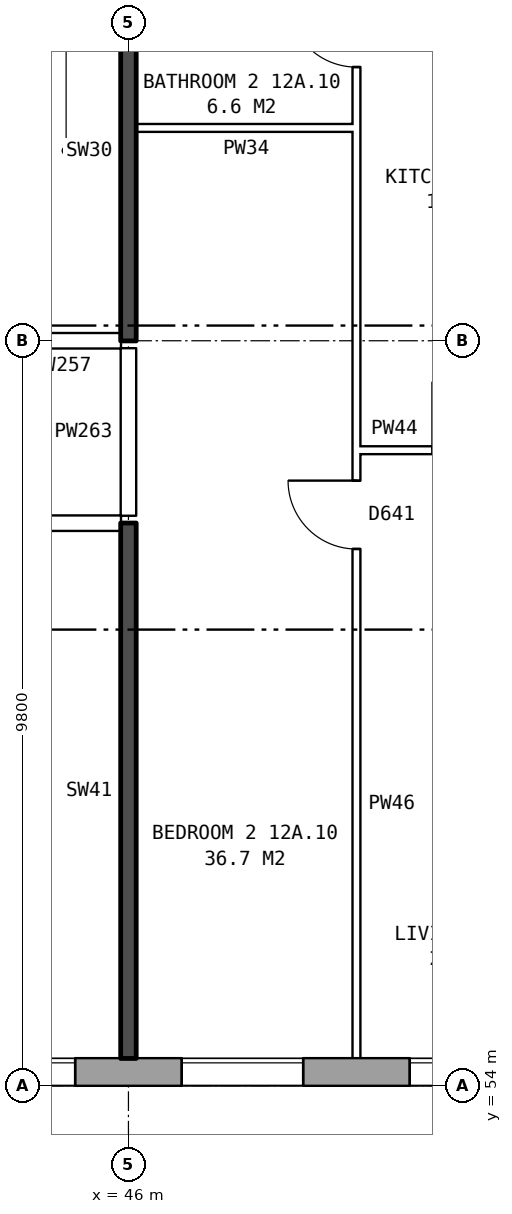
"""IFC4 building model, lengths in metres.
Left out: names, types, materials, properties, quantities, classifications, styles, units other than length and angle.
Written with IfcOpenShell. Run it as: python <this file> out.ifc"""

import sys

from ifc_helpers import new_model, si_unit, direction, frame, frame_2d, origin, place, context, subcontext, project, spatial, rectangle, extrude, element, fill, save


model = new_model("IFC4")
c1 = context("Model", 3, precision=1e-05, world=origin(), true_north=direction((0.0, 1.0)))
c2 = subcontext(c1, "Body", "Model", "MODEL_VIEW")
j1 = project(units=[si_unit("LENGTHUNIT", "METRE"), si_unit("PLANEANGLEUNIT", "RADIAN")], contexts=[c1])
p1 = place(None, origin())
s1 = spatial("IfcSite", under=j1, at=p1, CompositionType="ELEMENT")
p2 = place(p1, origin())
s2 = spatial("IfcBuilding", under=s1, at=p2, CompositionType="ELEMENT")
p3 = place(p2, frame((0.0, 0.0, 47.4)))
s3 = spatial("IfcBuildingStorey", under=s2, at=p3, CompositionType="ELEMENT", Elevation=47.4)
p4 = place(p3, frame((24.575, 54.18, 0.0), z_axis=(0.0, 0.0, 1.0), x_axis=(1.0, 0.0, 0.0)))
e1 = element("IfcWall", 1, at=p4, inside=s3, PredefinedType="STANDARD", context=c2, shape_type="SweptSolid", body=[
    extrude(rectangle(XDim=48.351, YDim=0.36, at=frame_2d((24.175, 0.0))), origin(), (0.0, 0.0, 1.0), 2.85),
])
p5 = place(p4, frame((1.125, 0.0, 0.8)))
e2 = element("IfcOpeningElement", 2, at=p5, cuts=e1, PredefinedType="OPENING", context=c2, shape_type="SweptSolid", body=[
    extrude(rectangle(XDim=1.6, YDim=1.8, at=frame_2d((0.8, 0.9))), frame((0.0, 0.19, 0.0), z_axis=(0.0, -1.0, 0.0), x_axis=(1.0, 0.0, 0.0)), (0.0, 0.0, 1.0), 0.38),
])
p6 = place(p4, frame((5.625, 0.0, 0.8)))
e3 = element("IfcOpeningElement", 3, at=p6, cuts=e1, PredefinedType="OPENING", context=c2, shape_type="SweptSolid", body=[
    extrude(rectangle(XDim=1.2, YDim=1.2, at=frame_2d((0.6, 0.6))), frame((0.0, 0.19, 0.0), z_axis=(0.0, -1.0, 0.0), x_axis=(1.0, 0.0, 0.0)), (0.0, 0.0, 1.0), 0.38),
])
p7 = place(p4, frame((7.125, 0.0, 0.8)))
e4 = element("IfcOpeningElement", 4, at=p7, cuts=e1, PredefinedType="OPENING", context=c2, shape_type="SweptSolid", body=[
    extrude(rectangle(XDim=1.6, YDim=1.8, at=frame_2d((0.8, 0.9))), frame((0.0, 0.19, 0.0), z_axis=(0.0, -1.0, 0.0), x_axis=(1.0, 0.0, 0.0)), (0.0, 0.0, 1.0), 0.38),
])
p8 = place(p4, frame((10.125, 0.0, 0.8)))
e5 = element("IfcOpeningElement", 5, at=p8, cuts=e1, PredefinedType="OPENING", context=c2, shape_type="SweptSolid", body=[
    extrude(rectangle(XDim=1.6, YDim=1.8, at=frame_2d((0.8, 0.9))), frame((0.0, 0.19, 0.0), z_axis=(0.0, -1.0, 0.0), x_axis=(1.0, 0.0, 0.0)), (0.0, 0.0, 1.0), 0.38),
])
p9 = place(p4, frame((13.125, 0.0, 0.8)))
e6 = element("IfcOpeningElement", 6, at=p9, cuts=e1, PredefinedType="OPENING", context=c2, shape_type="SweptSolid", body=[
    extrude(rectangle(XDim=1.6, YDim=1.8, at=frame_2d((0.8, 0.9))), frame((0.0, 0.19, 0.0), z_axis=(0.0, -1.0, 0.0), x_axis=(1.0, 0.0, 0.0)), (0.0, 0.0, 1.0), 0.38),
])
p10 = place(p4, frame((16.125, 0.0, 0.8)))
e7 = element("IfcOpeningElement", 7, at=p10, cuts=e1, PredefinedType="OPENING", context=c2, shape_type="SweptSolid", body=[
    extrude(rectangle(XDim=1.6, YDim=1.8, at=frame_2d((0.8, 0.9))), frame((0.0, 0.19, 0.0), z_axis=(0.0, -1.0, 0.0), x_axis=(1.0, 0.0, 0.0)), (0.0, 0.0, 1.0), 0.38),
])
p11 = place(p4, frame((19.125, 0.0, 0.8)))
e8 = element("IfcOpeningElement", 8, at=p11, cuts=e1, PredefinedType="OPENING", context=c2, shape_type="SweptSolid", body=[
    extrude(rectangle(XDim=1.6, YDim=1.8, at=frame_2d((0.8, 0.9))), frame((0.0, 0.19, 0.0), z_axis=(0.0, -1.0, 0.0), x_axis=(1.0, 0.0, 0.0)), (0.0, 0.0, 1.0), 0.38),
])
p12 = place(p4, frame((22.125, 0.0, 0.8)))
e9 = element("IfcOpeningElement", 9, at=p12, cuts=e1, PredefinedType="OPENING", context=c2, shape_type="SweptSolid", body=[
    extrude(rectangle(XDim=1.6, YDim=1.8, at=frame_2d((0.8, 0.9))), frame((0.0, 0.19, 0.0), z_axis=(0.0, -1.0, 0.0), x_axis=(1.0, 0.0, 0.0)), (0.0, 0.0, 1.0), 0.38),
])
p13 = place(p4, frame((25.125, 0.0, 0.8)))
e10 = element("IfcOpeningElement", 10, at=p13, cuts=e1, PredefinedType="OPENING", context=c2, shape_type="SweptSolid", body=[
    extrude(rectangle(XDim=1.6, YDim=1.8, at=frame_2d((0.8, 0.9))), frame((0.0, 0.19, 0.0), z_axis=(0.0, -1.0, 0.0), x_axis=(1.0, 0.0, 0.0)), (0.0, 0.0, 1.0), 0.38),
])
p14 = place(p4, frame((28.125, 0.0, 0.8)))
e11 = element("IfcOpeningElement", 11, at=p14, cuts=e1, PredefinedType="OPENING", context=c2, shape_type="SweptSolid", body=[
    extrude(rectangle(XDim=1.6, YDim=1.8, at=frame_2d((0.8, 0.9))), frame((0.0, 0.19, 0.0), z_axis=(0.0, -1.0, 0.0), x_axis=(1.0, 0.0, 0.0)), (0.0, 0.0, 1.0), 0.38),
])
p15 = place(p4, frame((31.125, 0.0, 0.8)))
e12 = element("IfcOpeningElement", 12, at=p15, cuts=e1, PredefinedType="OPENING", context=c2, shape_type="SweptSolid", body=[
    extrude(rectangle(XDim=1.6, YDim=1.8, at=frame_2d((0.8, 0.9))), frame((0.0, 0.19, 0.0), z_axis=(0.0, -1.0, 0.0), x_axis=(1.0, 0.0, 0.0)), (0.0, 0.0, 1.0), 0.38),
])
p16 = place(p4, frame((34.125, 0.0, 0.8)))
e13 = element("IfcOpeningElement", 13, at=p16, cuts=e1, PredefinedType="OPENING", context=c2, shape_type="SweptSolid", body=[
    extrude(rectangle(XDim=1.6, YDim=1.8, at=frame_2d((0.8, 0.9))), frame((0.0, 0.19, 0.0), z_axis=(0.0, -1.0, 0.0), x_axis=(1.0, 0.0, 0.0)), (0.0, 0.0, 1.0), 0.38),
])
p17 = place(p4, frame((37.125, 0.0, 0.8)))
e14 = element("IfcOpeningElement", 14, at=p17, cuts=e1, PredefinedType="OPENING", context=c2, shape_type="SweptSolid", body=[
    extrude(rectangle(XDim=1.6, YDim=1.8, at=frame_2d((0.8, 0.9))), frame((0.0, 0.19, 0.0), z_axis=(0.0, -1.0, 0.0), x_axis=(1.0, 0.0, 0.0)), (0.0, 0.0, 1.0), 0.38),
])
p18 = place(p4, frame((40.125, 0.0, 0.8)))
e15 = element("IfcOpeningElement", 15, at=p18, cuts=e1, PredefinedType="OPENING", context=c2, shape_type="SweptSolid", body=[
    extrude(rectangle(XDim=1.6, YDim=1.8, at=frame_2d((0.8, 0.9))), frame((0.0, 0.19, 0.0), z_axis=(0.0, -1.0, 0.0), x_axis=(1.0, 0.0, 0.0)), (0.0, 0.0, 1.0), 0.38),
])
p19 = place(p4, frame((42.025, 0.0, 0.8)))
e16 = element("IfcOpeningElement", 16, at=p19, cuts=e1, PredefinedType="OPENING", context=c2, shape_type="SweptSolid", body=[
    extrude(rectangle(XDim=1.0, YDim=0.9, at=frame_2d((0.5, 0.45))), frame((0.0, 0.19, 0.0), z_axis=(0.0, -1.0, 0.0), x_axis=(1.0, 0.0, 0.0)), (0.0, 0.0, 1.0), 0.38),
])
p20 = place(p4, frame((46.125, 0.0, 0.8)))
e17 = element("IfcOpeningElement", 17, at=p20, cuts=e1, PredefinedType="OPENING", context=c2, shape_type="SweptSolid", body=[
    extrude(rectangle(XDim=1.6, YDim=1.8, at=frame_2d((0.8, 0.9))), frame((0.0, 0.19, 0.0), z_axis=(0.0, -1.0, 0.0), x_axis=(1.0, 0.0, 0.0)), (0.0, 0.0, 1.0), 0.38),
])
p21 = place(p4, frame((44.525, 0.0, 1.7)))
e18 = element("IfcOpeningElement", 18, at=p21, cuts=e1, PredefinedType="OPENING", context=c2, shape_type="SweptSolid", body=[
    extrude(rectangle(XDim=0.6, YDim=0.9, at=frame_2d((0.3, 0.45))), frame((0.0, 0.19, 0.0), z_axis=(0.0, -1.0, 0.0), x_axis=(1.0, 0.0, 0.0)), (0.0, 0.0, 1.0), 0.38),
])
p22 = place(p3, frame((21.86, 61.4, 0.0), z_axis=(0.0, 0.0, 1.0), x_axis=(1.0, 0.0, 0.0)))
e19 = element("IfcWall", 19, at=p22, inside=s3, PredefinedType="PARTITIONING", context=c2, shape_type="SweptSolid", body=[
    extrude(rectangle(XDim=24.04, YDim=0.2, at=frame_2d((12.02, 0.0))), origin(), (0.0, 0.0, 1.0), 2.85),
])
p23 = place(p22, frame((20.59, 0.0, 0.0)))
e20 = element("IfcOpeningElement", 20, at=p23, cuts=e19, PredefinedType="OPENING", context=c2, shape_type="SweptSolid", body=[
    extrude(rectangle(XDim=1.0, YDim=2.1, at=frame_2d((0.5, 1.05))), frame((0.0, 0.11, 0.0), z_axis=(0.0, -1.0, 0.0), x_axis=(1.0, 0.0, 0.0)), (0.0, 0.0, 1.0), 0.22),
])
p24 = place(p22, frame((8.64, 0.0, 0.0)))
e21 = element("IfcOpeningElement", 21, at=p24, cuts=e19, PredefinedType="OPENING", context=c2, shape_type="SweptSolid", body=[
    extrude(rectangle(XDim=1.0, YDim=2.1, at=frame_2d((0.5, 1.05))), frame((0.0, 0.11, 0.0), z_axis=(0.0, -1.0, 0.0), x_axis=(1.0, 0.0, 0.0)), (0.0, 0.0, 1.0), 0.22),
])
p25 = place(p22, frame((3.64, 0.0, 0.0)))
e22 = element("IfcOpeningElement", 22, at=p25, cuts=e19, PredefinedType="OPENING", context=c2, shape_type="SweptSolid", body=[
    extrude(rectangle(XDim=1.0, YDim=2.1, at=frame_2d((0.5, 1.05))), frame((0.0, 0.11, 0.0), z_axis=(0.0, -1.0, 0.0), x_axis=(1.0, 0.0, 0.0)), (0.0, 0.0, 1.0), 0.22),
])
p26 = place(p3, frame((49.0, 62.36, 0.0), z_axis=(0.0, 0.0, 1.0), x_axis=(1.0, 0.0, 0.0)))
e23 = element("IfcWall", 23, at=p26, inside=s3, PredefinedType="PARTITIONING", context=c2, shape_type="SweptSolid", body=[
    extrude(rectangle(XDim=2.9, YDim=0.1, at=frame_2d((1.45, 0.0))), origin(), (0.0, 0.0, 1.0), 2.85),
])
p27 = place(p26, frame((1.0, 0.0, 0.0)))
e24 = element("IfcOpeningElement", 24, at=p27, cuts=e23, PredefinedType="OPENING", context=c2, shape_type="SweptSolid", body=[
    extrude(rectangle(XDim=0.9, YDim=2.1, at=frame_2d((0.45, 1.05))), frame((0.0, 0.06, 0.0), z_axis=(0.0, -1.0, 0.0), x_axis=(1.0, 0.0, 0.0)), (0.0, 0.0, 1.0), 0.12),
])
p28 = place(p3, frame((44.36, 63.8, 0.0), z_axis=(0.0, 0.0, 1.0), x_axis=(1.0, 0.0, 0.0)))
e25 = element("IfcWall", 25, at=p28, inside=s3, PredefinedType="PARTITIONING", context=c2, shape_type="SweptSolid", body=[
    extrude(rectangle(XDim=1.54, YDim=0.2, at=frame_2d((0.77, 0.0))), origin(), (0.0, 0.0, 1.0), 2.85),
])
p29 = place(p3, frame((46.1, 66.6, 0.0), z_axis=(0.0, 0.0, 1.0), x_axis=(1.0, 0.0, 0.0)))
e26 = element("IfcWall", 26, at=p29, inside=s3, PredefinedType="PARTITIONING", context=c2, shape_type="SweptSolid", body=[
    extrude(rectangle(XDim=2.9, YDim=0.1, at=frame_2d((1.45, 0.0))), origin(), (0.0, 0.0, 1.0), 2.85),
])
p30 = place(p3, frame((46.0, 54.36, 0.0), z_axis=(0.0, 0.0, 1.0), x_axis=(0.0, 1.0, 0.0)))
e27 = element("IfcWall", 27, at=p30, inside=s3, PredefinedType="SOLIDWALL", context=c2, shape_type="SweptSolid", body=[
    extrude(rectangle(XDim=7.04, YDim=0.2, at=frame_2d((3.52, 0.0))), origin(), (0.0, 0.0, 1.0), 2.85),
])
p31 = place(p3, frame((46.0, 61.5, 0.0), z_axis=(0.0, 0.0, 1.0), x_axis=(0.0, 1.0, 0.0)))
e28 = element("IfcWall", 28, at=p31, inside=s3, PredefinedType="PARTITIONING", context=c2, shape_type="SweptSolid", body=[
    extrude(rectangle(XDim=2.2, YDim=0.2, at=frame_2d((1.1, 0.0))), origin(), (0.0, 0.0, 1.0), 2.85),
])
p32 = place(p3, frame((46.0, 63.8, 0.0), z_axis=(0.0, 0.0, 1.0), x_axis=(0.0, 1.0, 0.0)))
e29 = element("IfcWall", 29, at=p32, inside=s3, PredefinedType="SOLIDWALL", context=c2, shape_type="SweptSolid", body=[
    extrude(rectangle(XDim=5.0, YDim=0.2, at=frame_2d((2.5, 0.0))), origin(), (0.0, 0.0, 1.0), 2.85),
])
p33 = place(p3, frame((49.0, 54.36, 0.0), z_axis=(0.0, 0.0, 1.0), x_axis=(0.0, 1.0, 0.0)))
e30 = element("IfcWall", 30, at=p33, inside=s3, PredefinedType="PARTITIONING", context=c2, shape_type="SweptSolid", body=[
    extrude(rectangle(XDim=14.34, YDim=0.1, at=frame_2d((7.17, 0.0))), origin(), (0.0, 0.0, 1.0), 2.85),
])
p34 = place(p33, frame((6.7, 0.0, 0.0)))
e31 = element("IfcOpeningElement", 31, at=p34, cuts=e30, PredefinedType="OPENING", context=c2, shape_type="SweptSolid", body=[
    extrude(rectangle(XDim=0.9, YDim=2.1, at=frame_2d((0.45, 1.05))), frame((0.0, 0.06, 0.0), z_axis=(0.0, -1.0, 0.0), x_axis=(1.0, 0.0, 0.0)), (0.0, 0.0, 1.0), 0.12),
])
p35 = place(p33, frame((13.04, 0.0, 0.0)))
e32 = element("IfcOpeningElement", 32, at=p35, cuts=e30, PredefinedType="OPENING", context=c2, shape_type="SweptSolid", body=[
    extrude(rectangle(XDim=0.9, YDim=2.1, at=frame_2d((0.45, 1.05))), frame((0.0, 0.06, 0.0), z_axis=(0.0, -1.0, 0.0), x_axis=(1.0, 0.0, 0.0)), (0.0, 0.0, 1.0), 0.12),
])
p36 = place(p11, origin())
e33 = element("IfcWindow", 33, at=p36, inside=s3, PartitioningType="SINGLE_PANEL", PredefinedType="WINDOW", context=c2, shape_type="SweptSolid", body=[
    extrude(rectangle(XDim=1.6, YDim=1.8, at=frame_2d((0.8, 0.9))), frame((0.0, 0.15, 0.0), z_axis=(0.0, -1.0, 0.0), x_axis=(1.0, 0.0, 0.0)), (0.0, 0.0, 1.0), 0.06),
])
fill(e8, e33)
p37 = place(p12, origin())
e34 = element("IfcWindow", 34, at=p37, inside=s3, PartitioningType="SINGLE_PANEL", PredefinedType="WINDOW", context=c2, shape_type="SweptSolid", body=[
    extrude(rectangle(XDim=1.6, YDim=1.8, at=frame_2d((0.8, 0.9))), frame((0.0, 0.15, 0.0), z_axis=(0.0, -1.0, 0.0), x_axis=(1.0, 0.0, 0.0)), (0.0, 0.0, 1.0), 0.06),
])
fill(e9, e34)
p38 = place(p13, origin())
e35 = element("IfcWindow", 35, at=p38, inside=s3, PartitioningType="SINGLE_PANEL", PredefinedType="WINDOW", context=c2, shape_type="SweptSolid", body=[
    extrude(rectangle(XDim=1.6, YDim=1.8, at=frame_2d((0.8, 0.9))), frame((0.0, 0.15, 0.0), z_axis=(0.0, -1.0, 0.0), x_axis=(1.0, 0.0, 0.0)), (0.0, 0.0, 1.0), 0.06),
])
fill(e10, e35)
p39 = place(p34, origin())
e36 = element("IfcDoor", 36, at=p39, inside=s3, OperationType="SINGLE_SWING_RIGHT", PredefinedType="DOOR", context=c2, shape_type="SweptSolid", body=[
    extrude(rectangle(XDim=0.9, YDim=2.1, at=frame_2d((0.45, 1.05))), frame((0.0, 0.025, 0.0), z_axis=(0.0, -1.0, 0.0), x_axis=(1.0, 0.0, 0.0)), (0.0, 0.0, 1.0), 0.05),
])
fill(e31, e36)
p40 = place(p35, origin())
e37 = element("IfcDoor", 37, at=p40, inside=s3, OperationType="SINGLE_SWING_RIGHT", PredefinedType="DOOR", context=c2, shape_type="SweptSolid", body=[
    extrude(rectangle(XDim=0.9, YDim=2.1, at=frame_2d((0.45, 1.05))), frame((0.0, 0.025, 0.0), z_axis=(0.0, -1.0, 0.0), x_axis=(1.0, 0.0, 0.0)), (0.0, 0.0, 1.0), 0.05),
])
fill(e32, e37)
save(model, sys.argv[1])
